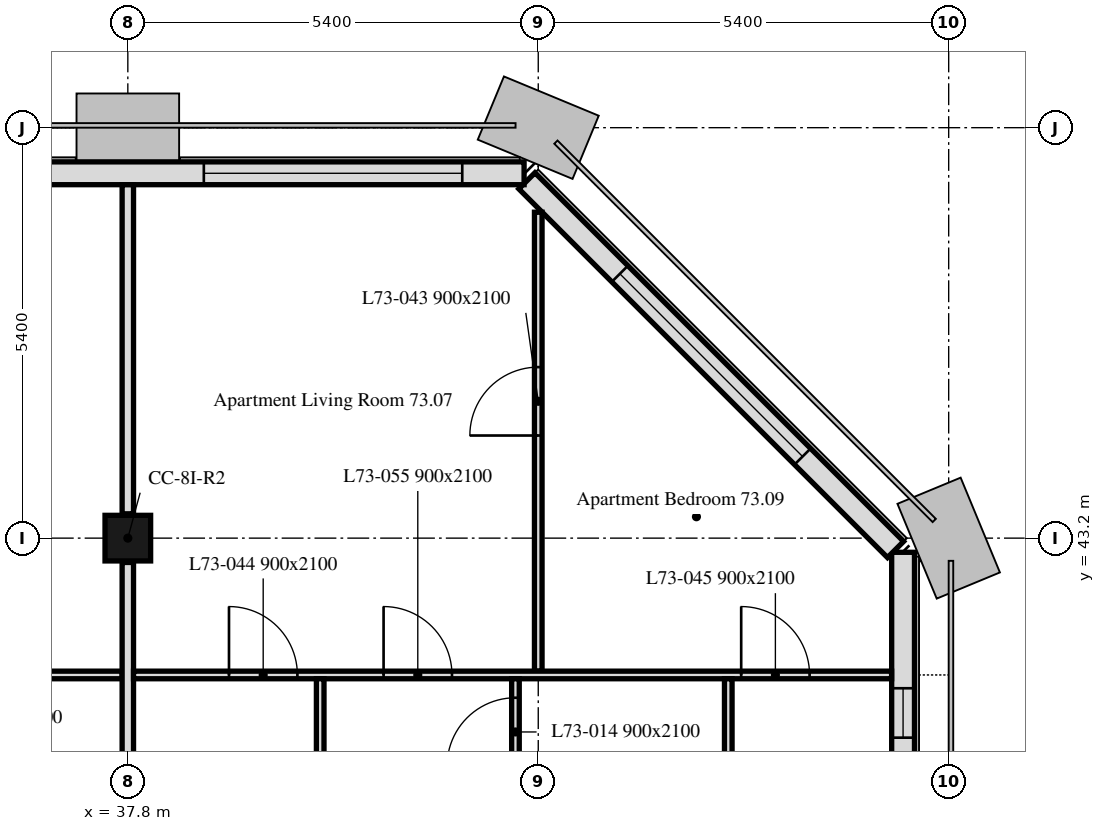
"""IFC4 building model, lengths in metres.
Left out: names, types, materials, properties, quantities, classifications, styles, units other than length and angle.
Written with IfcOpenShell. Run it as: python <this file> out.ifc"""

import sys

from ifc_helpers import new_model, si_unit, direction, frame, frame_2d, origin, origin_2d, place, context, subcontext, project, spatial, rectangle, extrude, element, fill, save


model = new_model("IFC4")
c1 = context("Model", 3, precision=1e-05, world=origin(), true_north=direction((0.0, 1.0)))
c2 = subcontext(c1, "Body", "Model", "MODEL_VIEW")
j1 = project(units=[si_unit("LENGTHUNIT", "METRE"), si_unit("PLANEANGLEUNIT", "RADIAN")], contexts=[c1])
p1 = place(None, origin())
s1 = spatial("IfcSite", under=j1, at=p1, CompositionType="ELEMENT")
p2 = place(p1, origin())
s2 = spatial("IfcBuilding", under=s1, at=p2, CompositionType="ELEMENT")
p3 = place(p2, frame((0.0, 0.0, 295.0)))
s3 = spatial("IfcBuildingStorey", under=s2, at=p3, CompositionType="ELEMENT", Elevation=295.0)
p4 = place(p3, frame((37.8, 43.2, 0.0), z_axis=(0.0, 0.0, 1.0), x_axis=(1.0, 0.0, 0.0)))
e1 = element("IfcColumn", 1, at=p4, inside=s3, PredefinedType="COLUMN", context=c2, shape_type="SweptSolid", body=[
    extrude(rectangle(XDim=0.6, YDim=0.6, at=origin_2d()), origin(), (0.0, 0.0, 1.0), 3.0),
])
p5 = place(p3, frame((48.0, 10.986, 0.0), z_axis=(0.0, 0.0, 1.0), x_axis=(0.0, 1.0, 0.0)))
e2 = element("IfcWall", 2, at=p5, inside=s3, PredefinedType="SOLIDWALL", context=c2, shape_type="SweptSolid", body=[
    extrude(rectangle(XDim=32.027, YDim=0.3, at=frame_2d((16.014, 0.0))), origin(), (0.0, 0.0, 1.0), 3.0),
])
p6 = place(p5, frame((1.164, 0.0, 0.9)))
e3 = element("IfcOpeningElement", 3, at=p6, cuts=e2, PredefinedType="OPENING", context=c2, shape_type="SweptSolid", body=[
    extrude(rectangle(XDim=1.1, YDim=1.7, at=frame_2d((0.55, 0.85))), frame((0.0, 0.16, 0.0), z_axis=(0.0, -1.0, 0.0), x_axis=(1.0, 0.0, 0.0)), (0.0, 0.0, 1.0), 0.32),
])
p7 = place(p5, frame((3.114, 0.0, 0.9)))
e4 = element("IfcOpeningElement", 4, at=p7, cuts=e2, PredefinedType="OPENING", context=c2, shape_type="SweptSolid", body=[
    extrude(rectangle(XDim=1.1, YDim=1.7, at=frame_2d((0.55, 0.85))), frame((0.0, 0.16, 0.0), z_axis=(0.0, -1.0, 0.0), x_axis=(1.0, 0.0, 0.0)), (0.0, 0.0, 1.0), 0.32),
])
p8 = place(p5, frame((6.564, 0.0, 0.9)))
e5 = element("IfcOpeningElement", 5, at=p8, cuts=e2, PredefinedType="OPENING", context=c2, shape_type="SweptSolid", body=[
    extrude(rectangle(XDim=1.1, YDim=1.7, at=frame_2d((0.55, 0.85))), frame((0.0, 0.16, 0.0), z_axis=(0.0, -1.0, 0.0), x_axis=(1.0, 0.0, 0.0)), (0.0, 0.0, 1.0), 0.32),
])
p9 = place(p5, frame((8.164, 0.0, 0.9)))
e6 = element("IfcOpeningElement", 6, at=p9, cuts=e2, PredefinedType="OPENING", context=c2, shape_type="SweptSolid", body=[
    extrude(rectangle(XDim=1.1, YDim=1.7, at=frame_2d((0.55, 0.85))), frame((0.0, 0.16, 0.0), z_axis=(0.0, -1.0, 0.0), x_axis=(1.0, 0.0, 0.0)), (0.0, 0.0, 1.0), 0.32),
])
p10 = place(p5, frame((11.614, 0.0, 0.9)))
e7 = element("IfcOpeningElement", 7, at=p10, cuts=e2, PredefinedType="OPENING", context=c2, shape_type="SweptSolid", body=[
    extrude(rectangle(XDim=3.4, YDim=1.7, at=frame_2d((1.7, 0.85))), frame((0.0, 0.16, 0.0), z_axis=(0.0, -1.0, 0.0), x_axis=(1.0, 0.0, 0.0)), (0.0, 0.0, 1.0), 0.32),
])
p11 = place(p5, frame((17.364, 0.0, 0.9)))
e8 = element("IfcOpeningElement", 8, at=p11, cuts=e2, PredefinedType="OPENING", context=c2, shape_type="SweptSolid", body=[
    extrude(rectangle(XDim=1.1, YDim=1.7, at=frame_2d((0.55, 0.85))), frame((0.0, 0.16, 0.0), z_axis=(0.0, -1.0, 0.0), x_axis=(1.0, 0.0, 0.0)), (0.0, 0.0, 1.0), 0.32),
])
p12 = place(p5, frame((18.964, 0.0, 0.9)))
e9 = element("IfcOpeningElement", 9, at=p12, cuts=e2, PredefinedType="OPENING", context=c2, shape_type="SweptSolid", body=[
    extrude(rectangle(XDim=1.1, YDim=1.7, at=frame_2d((0.55, 0.85))), frame((0.0, 0.16, 0.0), z_axis=(0.0, -1.0, 0.0), x_axis=(1.0, 0.0, 0.0)), (0.0, 0.0, 1.0), 0.32),
])
p13 = place(p5, frame((22.839, 0.0, 0.9)))
e10 = element("IfcOpeningElement", 10, at=p13, cuts=e2, PredefinedType="OPENING", context=c2, shape_type="SweptSolid", body=[
    extrude(rectangle(XDim=0.65, YDim=1.7, at=frame_2d((0.325, 0.85))), frame((0.0, 0.16, 0.0), z_axis=(0.0, -1.0, 0.0), x_axis=(1.0, 0.0, 0.0)), (0.0, 0.0, 1.0), 0.32),
])
p14 = place(p5, frame((24.364, 0.0, 0.9)))
e11 = element("IfcOpeningElement", 11, at=p14, cuts=e2, PredefinedType="OPENING", context=c2, shape_type="SweptSolid", body=[
    extrude(rectangle(XDim=1.1, YDim=1.7, at=frame_2d((0.55, 0.85))), frame((0.0, 0.16, 0.0), z_axis=(0.0, -1.0, 0.0), x_axis=(1.0, 0.0, 0.0)), (0.0, 0.0, 1.0), 0.32),
])
p15 = place(p5, frame((28.164, 0.0, 0.9)))
e12 = element("IfcOpeningElement", 12, at=p15, cuts=e2, PredefinedType="OPENING", context=c2, shape_type="SweptSolid", body=[
    extrude(rectangle(XDim=1.1, YDim=1.7, at=frame_2d((0.55, 0.85))), frame((0.0, 0.16, 0.0), z_axis=(0.0, -1.0, 0.0), x_axis=(1.0, 0.0, 0.0)), (0.0, 0.0, 1.0), 0.32),
])
p16 = place(p5, frame((29.589, 0.0, 0.9)))
e13 = element("IfcOpeningElement", 13, at=p16, cuts=e2, PredefinedType="OPENING", context=c2, shape_type="SweptSolid", body=[
    extrude(rectangle(XDim=0.65, YDim=1.7, at=frame_2d((0.325, 0.85))), frame((0.0, 0.16, 0.0), z_axis=(0.0, -1.0, 0.0), x_axis=(1.0, 0.0, 0.0)), (0.0, 0.0, 1.0), 0.32),
])
p17 = place(p3, frame((47.901, 43.051, 0.0), z_axis=(0.0, 0.0, 1.0), x_axis=(-0.707106781187, 0.707106781187, 0.0)))
e14 = element("IfcWall", 14, at=p17, inside=s3, PredefinedType="SOLIDWALL", context=c2, shape_type="SweptSolid", body=[
    extrude(rectangle(XDim=6.86, YDim=0.3, at=frame_2d((3.43, 0.0))), origin(), (0.0, 0.0, 1.0), 3.0),
])
p18 = place(p17, frame((1.73, 0.0, 0.9)))
e15 = element("IfcOpeningElement", 15, at=p18, cuts=e14, PredefinedType="OPENING", context=c2, shape_type="SweptSolid", body=[
    extrude(rectangle(XDim=3.4, YDim=1.7, at=frame_2d((1.7, 0.85))), frame((0.0, 0.16, 0.0), z_axis=(0.0, -1.0, 0.0), x_axis=(1.0, 0.0, 0.0)), (0.0, 0.0, 1.0), 0.32),
])
p19 = place(p3, frame((43.014, 48.0, 0.0), z_axis=(0.0, 0.0, 1.0), x_axis=(-1.0, 0.0, 0.0)))
e16 = element("IfcWall", 16, at=p19, inside=s3, PredefinedType="SOLIDWALL", context=c2, shape_type="SweptSolid", body=[
    extrude(rectangle(XDim=32.027, YDim=0.3, at=frame_2d((16.014, 0.0))), origin(), (0.0, 0.0, 1.0), 3.0),
])
p20 = place(p19, frame((0.814, 0.0, 0.9)))
e17 = element("IfcOpeningElement", 17, at=p20, cuts=e16, PredefinedType="OPENING", context=c2, shape_type="SweptSolid", body=[
    extrude(rectangle(XDim=3.4, YDim=1.7, at=frame_2d((1.7, 0.85))), frame((0.0, 0.16, 0.0), z_axis=(0.0, -1.0, 0.0), x_axis=(1.0, 0.0, 0.0)), (0.0, 0.0, 1.0), 0.32),
])
p21 = place(p19, frame((6.564, 0.0, 0.9)))
e18 = element("IfcOpeningElement", 18, at=p21, cuts=e16, PredefinedType="OPENING", context=c2, shape_type="SweptSolid", body=[
    extrude(rectangle(XDim=1.1, YDim=1.7, at=frame_2d((0.55, 0.85))), frame((0.0, 0.16, 0.0), z_axis=(0.0, -1.0, 0.0), x_axis=(1.0, 0.0, 0.0)), (0.0, 0.0, 1.0), 0.32),
])
p22 = place(p19, frame((11.614, 0.0, 0.9)))
e19 = element("IfcOpeningElement", 19, at=p22, cuts=e16, PredefinedType="OPENING", context=c2, shape_type="SweptSolid", body=[
    extrude(rectangle(XDim=3.4, YDim=1.7, at=frame_2d((1.7, 0.85))), frame((0.0, 0.16, 0.0), z_axis=(0.0, -1.0, 0.0), x_axis=(1.0, 0.0, 0.0)), (0.0, 0.0, 1.0), 0.32),
])
p23 = place(p19, frame((17.364, 0.0, 0.9)))
e20 = element("IfcOpeningElement", 20, at=p23, cuts=e16, PredefinedType="OPENING", context=c2, shape_type="SweptSolid", body=[
    extrude(rectangle(XDim=1.1, YDim=1.7, at=frame_2d((0.55, 0.85))), frame((0.0, 0.16, 0.0), z_axis=(0.0, -1.0, 0.0), x_axis=(1.0, 0.0, 0.0)), (0.0, 0.0, 1.0), 0.32),
])
p24 = place(p19, frame((22.414, 0.0, 0.9)))
e21 = element("IfcOpeningElement", 21, at=p24, cuts=e16, PredefinedType="OPENING", context=c2, shape_type="SweptSolid", body=[
    extrude(rectangle(XDim=3.4, YDim=1.7, at=frame_2d((1.7, 0.85))), frame((0.0, 0.16, 0.0), z_axis=(0.0, -1.0, 0.0), x_axis=(1.0, 0.0, 0.0)), (0.0, 0.0, 1.0), 0.32),
])
p25 = place(p19, frame((28.164, 0.0, 0.9)))
e22 = element("IfcOpeningElement", 22, at=p25, cuts=e16, PredefinedType="OPENING", context=c2, shape_type="SweptSolid", body=[
    extrude(rectangle(XDim=1.1, YDim=1.7, at=frame_2d((0.55, 0.85))), frame((0.0, 0.16, 0.0), z_axis=(0.0, -1.0, 0.0), x_axis=(1.0, 0.0, 0.0)), (0.0, 0.0, 1.0), 0.32),
])
p26 = place(p3, frame((32.37, 41.4, 0.0), z_axis=(0.0, 0.0, 1.0), x_axis=(1.0, 0.0, 0.0)))
e23 = element("IfcWall", 23, at=p26, inside=s3, PredefinedType="PARTITIONING", context=c2, shape_type="SweptSolid", body=[
    extrude(rectangle(XDim=5.355, YDim=0.1, at=frame_2d((2.677, 0.0))), origin(), (0.0, 0.0, 1.0), 3.0),
])
p27 = place(p26, frame((2.578, 0.0, 0.0)))
e24 = element("IfcOpeningElement", 24, at=p27, cuts=e23, PredefinedType="OPENING", context=c2, shape_type="SweptSolid", body=[
    extrude(rectangle(XDim=0.9, YDim=2.1, at=frame_2d((0.45, 1.05))), frame((0.0, 0.05, 0.0), z_axis=(0.0, -1.0, 0.0), x_axis=(1.0, 0.0, 0.0)), (0.0, 0.0, 1.0), 0.1),
])
p28 = place(p3, frame((37.8, 43.52, 0.0), z_axis=(0.0, 0.0, 1.0), x_axis=(0.0, 1.0, 0.0)))
e25 = element("IfcWall", 25, at=p28, inside=s3, PredefinedType="PARTITIONING", context=c2, shape_type="SweptSolid", body=[
    extrude(rectangle(XDim=4.329, YDim=0.15, at=frame_2d((2.165, 0.0))), origin(), (0.0, 0.0, 1.0), 2.4),
])
p29 = place(p3, frame((37.8, 38.12, 0.0), z_axis=(0.0, 0.0, 1.0), x_axis=(0.0, 1.0, 0.0)))
e26 = element("IfcWall", 26, at=p29, inside=s3, PredefinedType="PARTITIONING", context=c2, shape_type="SweptSolid", body=[
    extrude(rectangle(XDim=4.76, YDim=0.15, at=frame_2d((2.38, 0.0))), origin(), (0.0, 0.0, 1.0), 2.4),
])
p30 = place(p3, frame((43.2, 41.45, 0.0), z_axis=(0.0, 0.0, 1.0), x_axis=(0.0, 1.0, 0.0)))
e27 = element("IfcWall", 27, at=p30, inside=s3, PredefinedType="PARTITIONING", context=c2, shape_type="SweptSolid", body=[
    extrude(rectangle(XDim=6.038, YDim=0.1, at=frame_2d((3.019, 0.0))), origin(), (0.0, 0.0, 1.0), 3.0),
])
p31 = place(p30, frame((3.1, 0.0, 0.0)))
e28 = element("IfcOpeningElement", 28, at=p31, cuts=e27, PredefinedType="OPENING", context=c2, shape_type="SweptSolid", body=[
    extrude(rectangle(XDim=0.9, YDim=2.1, at=frame_2d((0.45, 1.05))), frame((0.0, 0.05, 0.0), z_axis=(0.0, -1.0, 0.0), x_axis=(1.0, 0.0, 0.0)), (0.0, 0.0, 1.0), 0.1),
])
p32 = place(p3, frame((37.875, 41.4, 0.0), z_axis=(0.0, 0.0, 1.0), x_axis=(1.0, 0.0, 0.0)))
e29 = element("IfcWall", 29, at=p32, inside=s3, PredefinedType="PARTITIONING", context=c2, shape_type="SweptSolid", body=[
    extrude(rectangle(XDim=9.974, YDim=0.1, at=frame_2d((4.987, 0.0))), origin(), (0.0, 0.0, 1.0), 3.0),
])
p33 = place(p32, frame((1.256, 0.0, 0.0)))
e30 = element("IfcOpeningElement", 30, at=p33, cuts=e29, PredefinedType="OPENING", context=c2, shape_type="SweptSolid", body=[
    extrude(rectangle(XDim=0.9, YDim=2.1, at=frame_2d((0.45, 1.05))), frame((0.0, 0.05, 0.0), z_axis=(0.0, -1.0, 0.0), x_axis=(1.0, 0.0, 0.0)), (0.0, 0.0, 1.0), 0.1),
])
p34 = place(p32, frame((7.995, 0.0, 0.0)))
e31 = element("IfcOpeningElement", 31, at=p34, cuts=e29, PredefinedType="OPENING", context=c2, shape_type="SweptSolid", body=[
    extrude(rectangle(XDim=0.9, YDim=2.1, at=frame_2d((0.45, 1.05))), frame((0.0, 0.05, 0.0), z_axis=(0.0, -1.0, 0.0), x_axis=(1.0, 0.0, 0.0)), (0.0, 0.0, 1.0), 0.1),
])
p35 = place(p32, frame((3.29, 0.0, 0.0)))
e32 = element("IfcOpeningElement", 32, at=p35, cuts=e29, PredefinedType="OPENING", context=c2, shape_type="SweptSolid", body=[
    extrude(rectangle(XDim=0.9, YDim=2.1, at=frame_2d((0.45, 1.05))), frame((0.0, 0.05, 0.0), z_axis=(0.0, -1.0, 0.0), x_axis=(1.0, 0.0, 0.0)), (0.0, 0.0, 1.0), 0.1),
])
p36 = place(p3, frame((40.331, 34.725, 0.0), z_axis=(0.0, 0.0, 1.0), x_axis=(0.0, 1.0, 0.0)))
e33 = element("IfcWall", 33, at=p36, inside=s3, PredefinedType="PARTITIONING", context=c2, shape_type="SweptSolid", body=[
    extrude(rectangle(XDim=6.625, YDim=0.1, at=frame_2d((3.312, 0.0))), origin(), (0.0, 0.0, 1.0), 2.4),
])
p37 = place(p36, frame((0.725, 0.0, 0.0)))
e34 = element("IfcOpeningElement", 34, at=p37, cuts=e33, PredefinedType="OPENING", context=c2, shape_type="SweptSolid", body=[
    extrude(rectangle(XDim=0.9, YDim=2.1, at=frame_2d((0.45, 1.05))), frame((0.0, 0.05, 0.0), z_axis=(0.0, -1.0, 0.0), x_axis=(1.0, 0.0, 0.0)), (0.0, 0.0, 1.0), 0.1),
])
p38 = place(p36, frame((4.329, 0.0, 0.0)))
e35 = element("IfcOpeningElement", 35, at=p38, cuts=e33, PredefinedType="OPENING", context=c2, shape_type="SweptSolid", body=[
    extrude(rectangle(XDim=0.9, YDim=2.1, at=frame_2d((0.45, 1.05))), frame((0.0, 0.05, 0.0), z_axis=(0.0, -1.0, 0.0), x_axis=(1.0, 0.0, 0.0)), (0.0, 0.0, 1.0), 0.1),
])
p39 = place(p3, frame((42.9, 38.12, 0.0), z_axis=(0.0, 0.0, 1.0), x_axis=(0.0, 1.0, 0.0)))
e36 = element("IfcWall", 36, at=p39, inside=s3, PredefinedType="PARTITIONING", context=c2, shape_type="SweptSolid", body=[
    extrude(rectangle(XDim=3.23, YDim=0.1, at=frame_2d((1.615, 0.0))), origin(), (0.0, 0.0, 1.0), 3.0),
])
p40 = place(p39, frame((2.08, 0.0, 0.0)))
e37 = element("IfcOpeningElement", 37, at=p40, cuts=e36, PredefinedType="OPENING", context=c2, shape_type="SweptSolid", body=[
    extrude(rectangle(XDim=0.9, YDim=2.1, at=frame_2d((0.45, 1.05))), frame((0.0, 0.05, 0.0), z_axis=(0.0, -1.0, 0.0), x_axis=(1.0, 0.0, 0.0)), (0.0, 0.0, 1.0), 0.1),
])
p41 = place(p3, frame((45.7, 37.2, 0.0), z_axis=(0.0, 0.0, 1.0), x_axis=(0.0, 1.0, 0.0)))
e38 = element("IfcWall", 38, at=p41, inside=s3, PredefinedType="PARTITIONING", context=c2, shape_type="SweptSolid", body=[
    extrude(rectangle(XDim=4.15, YDim=0.1, at=frame_2d((2.075, 0.0))), origin(), (0.0, 0.0, 1.0), 2.4),
])
p42 = place(p16, origin())
e39 = element("IfcWindow", 39, at=p42, inside=s3, PartitioningType="SINGLE_PANEL", PredefinedType="WINDOW", context=c2, shape_type="SweptSolid", body=[
    extrude(rectangle(XDim=0.65, YDim=1.7, at=frame_2d((0.325, 0.85))), frame((0.0, 0.03, 0.0), z_axis=(0.0, -1.0, 0.0), x_axis=(1.0, 0.0, 0.0)), (0.0, 0.0, 1.0), 0.06),
])
fill(e13, e39)
p43 = place(p18, origin())
e40 = element("IfcWindow", 40, at=p43, inside=s3, PartitioningType="SINGLE_PANEL", PredefinedType="WINDOW", context=c2, shape_type="SweptSolid", body=[
    extrude(rectangle(XDim=3.4, YDim=1.7, at=frame_2d((1.7, 0.85))), frame((0.0, 0.03, 0.0), z_axis=(0.0, -1.0, 0.0), x_axis=(1.0, 0.0, 0.0)), (0.0, 0.0, 1.0), 0.06),
])
fill(e15, e40)
p44 = place(p20, origin())
e41 = element("IfcWindow", 41, at=p44, inside=s3, PartitioningType="SINGLE_PANEL", PredefinedType="WINDOW", context=c2, shape_type="SweptSolid", body=[
    extrude(rectangle(XDim=3.4, YDim=1.7, at=frame_2d((1.7, 0.85))), frame((0.0, 0.03, 0.0), z_axis=(0.0, -1.0, 0.0), x_axis=(1.0, 0.0, 0.0)), (0.0, 0.0, 1.0), 0.06),
])
fill(e17, e41)
p45 = place(p40, origin())
e42 = element("IfcDoor", 42, at=p45, inside=s3, OperationType="SINGLE_SWING_LEFT", PredefinedType="DOOR", context=c2, shape_type="SweptSolid", body=[
    extrude(rectangle(XDim=0.9, YDim=2.1, at=frame_2d((0.45, 1.05))), frame((0.0, 0.025, 0.0), z_axis=(0.0, -1.0, 0.0), x_axis=(1.0, 0.0, 0.0)), (0.0, 0.0, 1.0), 0.05),
])
fill(e37, e42)
p46 = place(p31, origin())
e43 = element("IfcDoor", 43, at=p46, inside=s3, OperationType="SINGLE_SWING_LEFT", PredefinedType="DOOR", context=c2, shape_type="SweptSolid", body=[
    extrude(rectangle(XDim=0.9, YDim=2.1, at=frame_2d((0.45, 1.05))), frame((0.0, 0.025, 0.0), z_axis=(0.0, -1.0, 0.0), x_axis=(1.0, 0.0, 0.0)), (0.0, 0.0, 1.0), 0.05),
])
fill(e28, e43)
p47 = place(p33, origin())
e44 = element("IfcDoor", 44, at=p47, inside=s3, OperationType="SINGLE_SWING_LEFT", PredefinedType="DOOR", context=c2, shape_type="SweptSolid", body=[
    extrude(rectangle(XDim=0.9, YDim=2.1, at=frame_2d((0.45, 1.05))), frame((0.0, 0.025, 0.0), z_axis=(0.0, -1.0, 0.0), x_axis=(1.0, 0.0, 0.0)), (0.0, 0.0, 1.0), 0.05),
])
fill(e30, e44)
p48 = place(p34, origin())
e45 = element("IfcDoor", 45, at=p48, inside=s3, OperationType="SINGLE_SWING_RIGHT", PredefinedType="DOOR", context=c2, shape_type="SweptSolid", body=[
    extrude(rectangle(XDim=0.9, YDim=2.1, at=frame_2d((0.45, 1.05))), frame((0.0, 0.025, 0.0), z_axis=(0.0, -1.0, 0.0), x_axis=(1.0, 0.0, 0.0)), (0.0, 0.0, 1.0), 0.05),
])
fill(e31, e45)
p49 = place(p35, origin())
e46 = element("IfcDoor", 46, at=p49, inside=s3, OperationType="SINGLE_SWING_RIGHT", PredefinedType="DOOR", context=c2, shape_type="SweptSolid", body=[
    extrude(rectangle(XDim=0.9, YDim=2.1, at=frame_2d((0.45, 1.05))), frame((0.0, 0.025, 0.0), z_axis=(0.0, -1.0, 0.0), x_axis=(1.0, 0.0, 0.0)), (0.0, 0.0, 1.0), 0.05),
])
fill(e32, e46)
save(model, sys.argv[1])
